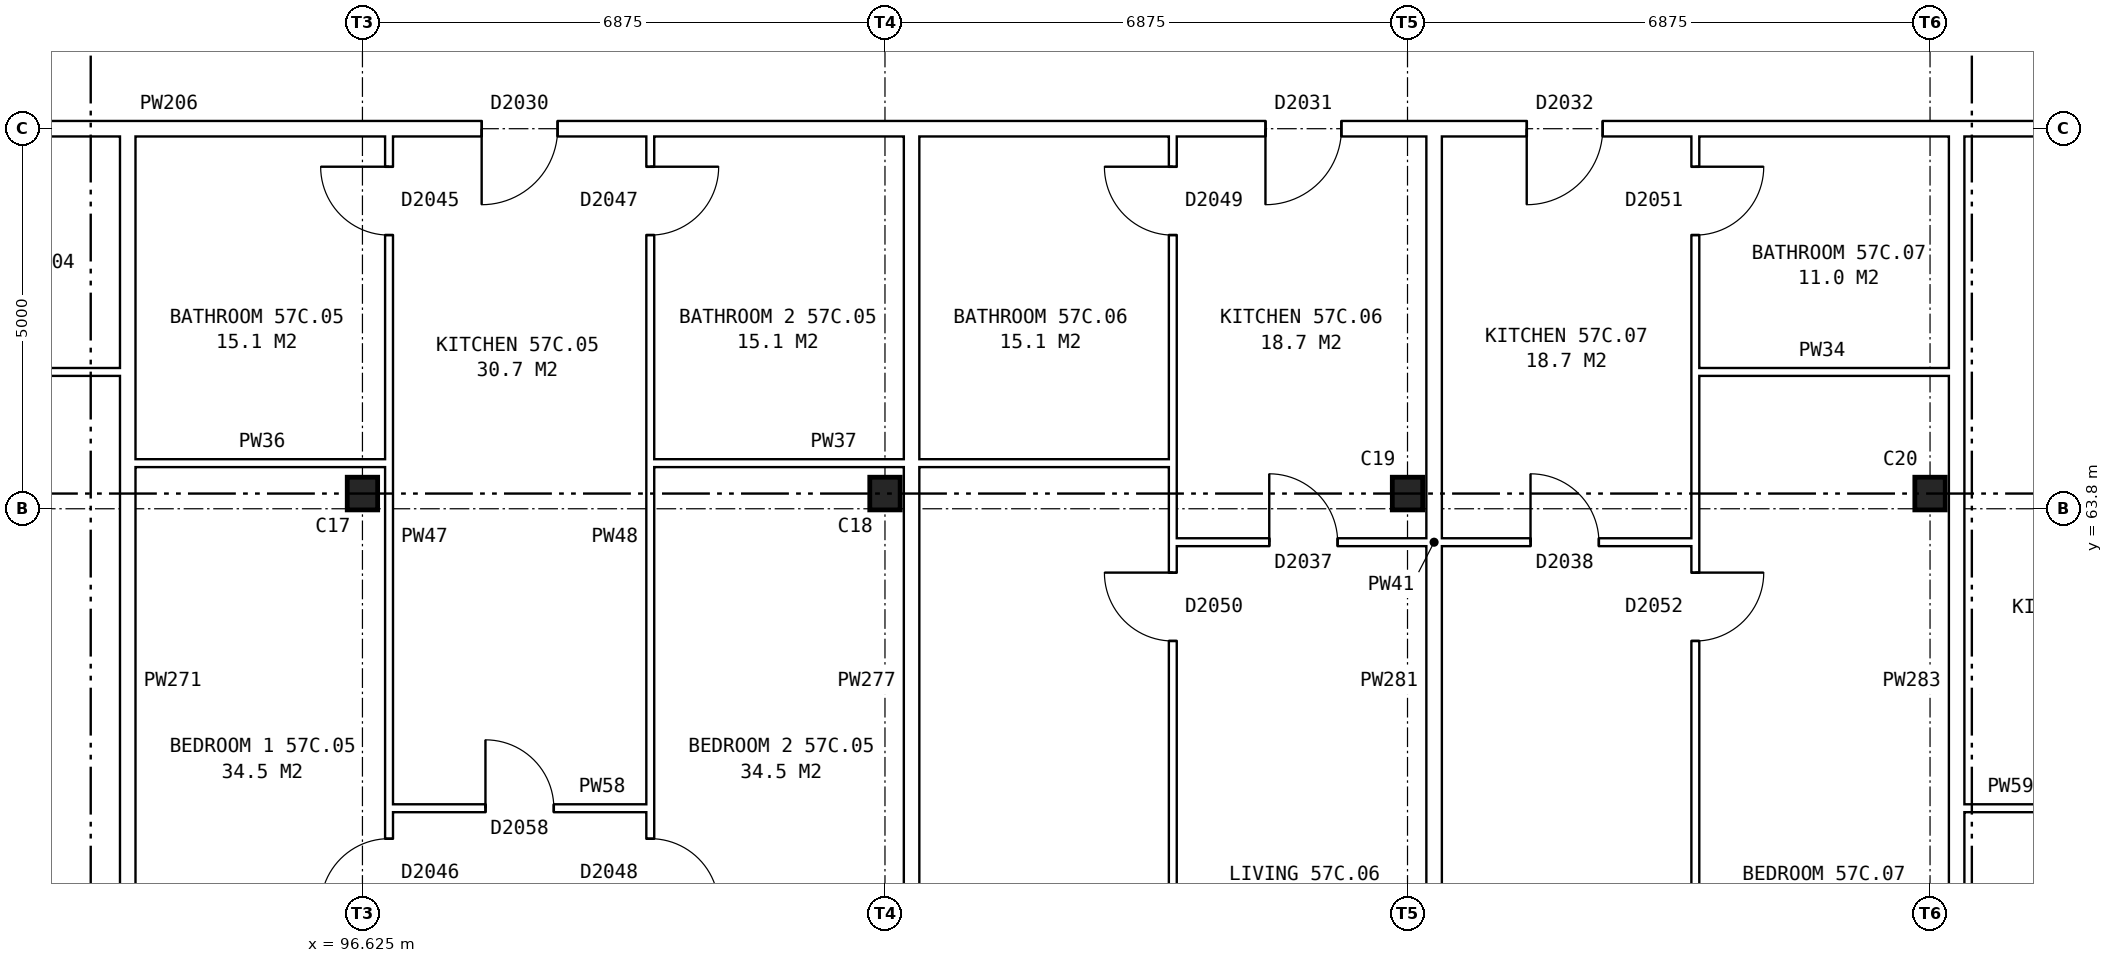
"""IFC4 building model, lengths in metres.
Left out: names, types, materials, properties, quantities, classifications, styles, units other than length and angle.
Written with IfcOpenShell. Run it as: python <this file> out.ifc"""

import sys

from ifc_helpers import new_model, si_unit, direction, frame, frame_2d, origin, origin_2d, place, context, subcontext, project, spatial, rectangle, i_section, extrude, element, fill, save


model = new_model("IFC4")
c1 = context("Model", 3, precision=1e-05, world=origin(), true_north=direction((0.0, 1.0)))
c2 = subcontext(c1, "Body", "Model", "MODEL_VIEW")
j1 = project(units=[si_unit("LENGTHUNIT", "METRE"), si_unit("PLANEANGLEUNIT", "RADIAN")], contexts=[c1])
p1 = place(None, origin())
s1 = spatial("IfcSite", under=j1, at=p1, CompositionType="ELEMENT")
p2 = place(p1, origin())
s2 = spatial("IfcBuilding", under=s1, at=p2, CompositionType="ELEMENT")
p3 = place(p2, frame((0.0, 0.0, 202.8)))
s3 = spatial("IfcBuildingStorey", under=s2, at=p3, CompositionType="ELEMENT", Elevation=202.8)
for number, where, z_axis, x_axis in (
    (1, (96.625, 64.0, 0.0), (0.0, 0.0, 1.0), (1.0, 0.0, 0.0)),
    (2, (103.5, 64.0, 0.0), (0.0, 0.0, 1.0), (1.0, 0.0, 0.0)),
    (3, (110.375, 64.0, 0.0), (0.0, 0.0, 1.0), (1.0, 0.0, 0.0)),
    (4, (117.25, 64.0, 0.0), (0.0, 0.0, 1.0), (1.0, 0.0, 0.0)),
):
    element("IfcColumn", number, at=place(p3, frame(where, z_axis=z_axis, x_axis=x_axis)), inside=s3, PredefinedType="COLUMN", context=c2, shape_type="SweptSolid", body=[
        extrude(i_section(OverallWidth=0.4, OverallDepth=0.43, WebThickness=0.04, FlangeThickness=0.04, at=origin_2d()), origin(), (0.0, 0.0, 1.0), 2.85),
    ])
p4 = place(p3, frame((96.975, 59.86, 0.0), z_axis=(0.0, 0.0, 1.0), x_axis=(1.0, 0.0, 0.0)))
e5 = element("IfcWall", 5, at=p4, inside=s3, PredefinedType="PARTITIONING", context=c2, shape_type="SweptSolid", body=[
    extrude(rectangle(XDim=3.437, YDim=0.1, at=frame_2d((1.719, 0.0))), origin(), (0.0, 0.0, 1.0), 2.85),
])
p5 = place(p4, frame((1.269, 0.0, 0.0)))
e6 = element("IfcOpeningElement", 6, at=p5, cuts=e5, PredefinedType="OPENING", context=c2, shape_type="SweptSolid", body=[
    extrude(rectangle(XDim=0.9, YDim=2.1, at=frame_2d((0.45, 1.05))), frame((0.0, 0.06, 0.0), z_axis=(0.0, -1.0, 0.0), x_axis=(1.0, 0.0, 0.0)), (0.0, 0.0, 1.0), 0.12),
])
p6 = place(p3, frame((117.7, 59.86, 0.0), z_axis=(0.0, 0.0, 1.0), x_axis=(1.0, 0.0, 0.0)))
e7 = element("IfcWall", 7, at=p6, inside=s3, PredefinedType="PARTITIONING", context=c2, shape_type="SweptSolid", body=[
    extrude(rectangle(XDim=3.337, YDim=0.1, at=frame_2d((1.668, 0.0))), origin(), (0.0, 0.0, 1.0), 2.85),
])
p7 = place(p6, frame((1.219, 0.0, 0.0)))
e8 = element("IfcOpeningElement", 8, at=p7, cuts=e7, PredefinedType="OPENING", context=c2, shape_type="SweptSolid", body=[
    extrude(rectangle(XDim=0.9, YDim=2.1, at=frame_2d((0.45, 1.05))), frame((0.0, 0.06, 0.0), z_axis=(0.0, -1.0, 0.0), x_axis=(1.0, 0.0, 0.0)), (0.0, 0.0, 1.0), 0.12),
])
p8 = place(p3, frame((107.287, 63.36, 0.0), z_axis=(0.0, 0.0, 1.0), x_axis=(1.0, 0.0, 0.0)))
e9 = element("IfcWall", 9, at=p8, inside=s3, PredefinedType="PARTITIONING", context=c2, shape_type="SweptSolid", body=[
    extrude(rectangle(XDim=6.875, YDim=0.1, at=frame_2d((3.438, 0.0))), origin(), (0.0, 0.0, 1.0), 2.85),
])
p9 = place(p8, frame((1.269, 0.0, 0.0)))
e10 = element("IfcOpeningElement", 10, at=p9, cuts=e9, PredefinedType="OPENING", context=c2, shape_type="SweptSolid", body=[
    extrude(rectangle(XDim=0.9, YDim=2.1, at=frame_2d((0.45, 1.05))), frame((0.0, 0.06, 0.0), z_axis=(0.0, -1.0, 0.0), x_axis=(1.0, 0.0, 0.0)), (0.0, 0.0, 1.0), 0.12),
])
p10 = place(p8, frame((4.707, 0.0, 0.0)))
e11 = element("IfcOpeningElement", 11, at=p10, cuts=e9, PredefinedType="OPENING", context=c2, shape_type="SweptSolid", body=[
    extrude(rectangle(XDim=0.9, YDim=2.1, at=frame_2d((0.45, 1.05))), frame((0.0, 0.06, 0.0), z_axis=(0.0, -1.0, 0.0), x_axis=(1.0, 0.0, 0.0)), (0.0, 0.0, 1.0), 0.12),
])
p11 = place(p3, frame((93.637, 64.4, 0.0), z_axis=(0.0, 0.0, 1.0), x_axis=(1.0, 0.0, 0.0)))
e12 = element("IfcWall", 12, at=p11, inside=s3, PredefinedType="PARTITIONING", context=c2, shape_type="SweptSolid", body=[
    extrude(rectangle(XDim=3.338, YDim=0.1, at=frame_2d((1.669, 0.0))), origin(), (0.0, 0.0, 1.0), 2.85),
])
p12 = place(p3, frame((100.412, 64.4, 0.0), z_axis=(0.0, 0.0, 1.0), x_axis=(1.0, 0.0, 0.0)))
e13 = element("IfcWall", 13, at=p12, inside=s3, PredefinedType="PARTITIONING", context=c2, shape_type="SweptSolid", body=[
    extrude(rectangle(XDim=6.875, YDim=0.1, at=frame_2d((3.438, 0.0))), origin(), (0.0, 0.0, 1.0), 2.85),
])
p13 = place(p3, frame((90.1, 65.6, 0.0), z_axis=(0.0, 0.0, 1.0), x_axis=(1.0, 0.0, 0.0)))
e14 = element("IfcWall", 14, at=p13, inside=s3, PredefinedType="PARTITIONING", context=c2, shape_type="SweptSolid", body=[
    extrude(rectangle(XDim=3.337, YDim=0.1, at=frame_2d((1.668, 0.0))), origin(), (0.0, 0.0, 1.0), 2.85),
])
p14 = place(p3, frame((114.162, 65.6, 0.0), z_axis=(0.0, 0.0, 1.0), x_axis=(1.0, 0.0, 0.0)))
e15 = element("IfcWall", 15, at=p14, inside=s3, PredefinedType="PARTITIONING", context=c2, shape_type="SweptSolid", body=[
    extrude(rectangle(XDim=3.338, YDim=0.1, at=frame_2d((1.669, 0.0))), origin(), (0.0, 0.0, 1.0), 2.85),
])
p15 = place(p3, frame((75.64, 68.8, 0.0), z_axis=(0.0, 0.0, 1.0), x_axis=(1.0, 0.0, 0.0)))
e16 = element("IfcWall", 16, at=p15, inside=s3, PredefinedType="PARTITIONING", context=c2, shape_type="SweptSolid", body=[
    extrude(rectangle(XDim=55.72, YDim=0.2, at=frame_2d((27.86, 0.0))), origin(), (0.0, 0.0, 1.0), 2.85),
])
p16 = place(p15, frame((5.191, 0.0, 0.0)))
e17 = element("IfcOpeningElement", 17, at=p16, cuts=e16, PredefinedType="OPENING", context=c2, shape_type="SweptSolid", body=[
    extrude(rectangle(XDim=1.0, YDim=2.1, at=frame_2d((0.5, 1.05))), frame((0.0, 0.11, 0.0), z_axis=(0.0, -1.0, 0.0), x_axis=(1.0, 0.0, 0.0)), (0.0, 0.0, 1.0), 0.22),
])
p17 = place(p15, frame((12.241, 0.0, 0.0)))
e18 = element("IfcOpeningElement", 18, at=p17, cuts=e16, PredefinedType="OPENING", context=c2, shape_type="SweptSolid", body=[
    extrude(rectangle(XDim=1.0, YDim=2.1, at=frame_2d((0.5, 1.05))), frame((0.0, 0.11, 0.0), z_axis=(0.0, -1.0, 0.0), x_axis=(1.0, 0.0, 0.0)), (0.0, 0.0, 1.0), 0.22),
])
p18 = place(p15, frame((22.553, 0.0, 0.0)))
e19 = element("IfcOpeningElement", 19, at=p18, cuts=e16, PredefinedType="OPENING", context=c2, shape_type="SweptSolid", body=[
    extrude(rectangle(XDim=1.0, YDim=2.1, at=frame_2d((0.5, 1.05))), frame((0.0, 0.11, 0.0), z_axis=(0.0, -1.0, 0.0), x_axis=(1.0, 0.0, 0.0)), (0.0, 0.0, 1.0), 0.22),
])
p19 = place(p15, frame((32.866, 0.0, 0.0)))
e20 = element("IfcOpeningElement", 20, at=p19, cuts=e16, PredefinedType="OPENING", context=c2, shape_type="SweptSolid", body=[
    extrude(rectangle(XDim=1.0, YDim=2.1, at=frame_2d((0.5, 1.05))), frame((0.0, 0.11, 0.0), z_axis=(0.0, -1.0, 0.0), x_axis=(1.0, 0.0, 0.0)), (0.0, 0.0, 1.0), 0.22),
])
p20 = place(p15, frame((36.303, 0.0, 0.0)))
e21 = element("IfcOpeningElement", 21, at=p20, cuts=e16, PredefinedType="OPENING", context=c2, shape_type="SweptSolid", body=[
    extrude(rectangle(XDim=1.0, YDim=2.1, at=frame_2d((0.5, 1.05))), frame((0.0, 0.11, 0.0), z_axis=(0.0, -1.0, 0.0), x_axis=(1.0, 0.0, 0.0)), (0.0, 0.0, 1.0), 0.22),
])
p21 = place(p15, frame((43.178, 0.0, 0.0)))
e22 = element("IfcOpeningElement", 22, at=p21, cuts=e16, PredefinedType="OPENING", context=c2, shape_type="SweptSolid", body=[
    extrude(rectangle(XDim=1.0, YDim=2.1, at=frame_2d((0.5, 1.05))), frame((0.0, 0.11, 0.0), z_axis=(0.0, -1.0, 0.0), x_axis=(1.0, 0.0, 0.0)), (0.0, 0.0, 1.0), 0.22),
])
p22 = place(p15, frame((50.053, 0.0, 0.0)))
e23 = element("IfcOpeningElement", 23, at=p22, cuts=e16, PredefinedType="OPENING", context=c2, shape_type="SweptSolid", body=[
    extrude(rectangle(XDim=1.0, YDim=2.1, at=frame_2d((0.5, 1.05))), frame((0.0, 0.11, 0.0), z_axis=(0.0, -1.0, 0.0), x_axis=(1.0, 0.0, 0.0)), (0.0, 0.0, 1.0), 0.22),
])
p23 = place(p3, frame((93.537, 54.36, 0.0), z_axis=(0.0, 0.0, 1.0), x_axis=(0.0, 1.0, 0.0)))
e24 = element("IfcWall", 24, at=p23, inside=s3, PredefinedType="PARTITIONING", context=c2, shape_type="SweptSolid", body=[
    extrude(rectangle(XDim=14.34, YDim=0.2, at=frame_2d((7.17, 0.0))), origin(), (0.0, 0.0, 1.0), 2.85),
])
p24 = place(p3, frame((96.975, 54.36, 0.0), z_axis=(0.0, 0.0, 1.0), x_axis=(0.0, 1.0, 0.0)))
e25 = element("IfcWall", 25, at=p24, inside=s3, PredefinedType="PARTITIONING", context=c2, shape_type="SweptSolid", body=[
    extrude(rectangle(XDim=14.34, YDim=0.1, at=frame_2d((7.17, 0.0))), origin(), (0.0, 0.0, 1.0), 2.85),
])
p25 = place(p24, frame((4.2, 0.0, 0.0)))
e26 = element("IfcOpeningElement", 26, at=p25, cuts=e25, PredefinedType="OPENING", context=c2, shape_type="SweptSolid", body=[
    extrude(rectangle(XDim=0.9, YDim=2.1, at=frame_2d((0.45, 1.05))), frame((0.0, 0.06, 0.0), z_axis=(0.0, -1.0, 0.0), x_axis=(1.0, 0.0, 0.0)), (0.0, 0.0, 1.0), 0.12),
])
p26 = place(p24, frame((13.04, 0.0, 0.0)))
e27 = element("IfcOpeningElement", 27, at=p26, cuts=e25, PredefinedType="OPENING", context=c2, shape_type="SweptSolid", body=[
    extrude(rectangle(XDim=0.9, YDim=2.1, at=frame_2d((0.45, 1.05))), frame((0.0, 0.06, 0.0), z_axis=(0.0, -1.0, 0.0), x_axis=(1.0, 0.0, 0.0)), (0.0, 0.0, 1.0), 0.12),
])
p27 = place(p3, frame((100.412, 54.36, 0.0), z_axis=(0.0, 0.0, 1.0), x_axis=(0.0, 1.0, 0.0)))
e28 = element("IfcWall", 28, at=p27, inside=s3, PredefinedType="PARTITIONING", context=c2, shape_type="SweptSolid", body=[
    extrude(rectangle(XDim=14.34, YDim=0.1, at=frame_2d((7.17, 0.0))), origin(), (0.0, 0.0, 1.0), 2.85),
])
p28 = place(p27, frame((4.2, 0.0, 0.0)))
e29 = element("IfcOpeningElement", 29, at=p28, cuts=e28, PredefinedType="OPENING", context=c2, shape_type="SweptSolid", body=[
    extrude(rectangle(XDim=0.9, YDim=2.1, at=frame_2d((0.45, 1.05))), frame((0.0, 0.06, 0.0), z_axis=(0.0, -1.0, 0.0), x_axis=(1.0, 0.0, 0.0)), (0.0, 0.0, 1.0), 0.12),
])
p29 = place(p27, frame((13.04, 0.0, 0.0)))
e30 = element("IfcOpeningElement", 30, at=p29, cuts=e28, PredefinedType="OPENING", context=c2, shape_type="SweptSolid", body=[
    extrude(rectangle(XDim=0.9, YDim=2.1, at=frame_2d((0.45, 1.05))), frame((0.0, 0.06, 0.0), z_axis=(0.0, -1.0, 0.0), x_axis=(1.0, 0.0, 0.0)), (0.0, 0.0, 1.0), 0.12),
])
p30 = place(p3, frame((103.85, 54.36, 0.0), z_axis=(0.0, 0.0, 1.0), x_axis=(0.0, 1.0, 0.0)))
e31 = element("IfcWall", 31, at=p30, inside=s3, PredefinedType="PARTITIONING", context=c2, shape_type="SweptSolid", body=[
    extrude(rectangle(XDim=14.34, YDim=0.2, at=frame_2d((7.17, 0.0))), origin(), (0.0, 0.0, 1.0), 2.85),
])
p31 = place(p3, frame((107.287, 54.36, 0.0), z_axis=(0.0, 0.0, 1.0), x_axis=(0.0, 1.0, 0.0)))
e32 = element("IfcWall", 32, at=p31, inside=s3, PredefinedType="PARTITIONING", context=c2, shape_type="SweptSolid", body=[
    extrude(rectangle(XDim=14.34, YDim=0.1, at=frame_2d((7.17, 0.0))), origin(), (0.0, 0.0, 1.0), 2.85),
])
p32 = place(p31, frame((7.7, 0.0, 0.0)))
e33 = element("IfcOpeningElement", 33, at=p32, cuts=e32, PredefinedType="OPENING", context=c2, shape_type="SweptSolid", body=[
    extrude(rectangle(XDim=0.9, YDim=2.1, at=frame_2d((0.45, 1.05))), frame((0.0, 0.06, 0.0), z_axis=(0.0, -1.0, 0.0), x_axis=(1.0, 0.0, 0.0)), (0.0, 0.0, 1.0), 0.12),
])
p33 = place(p31, frame((13.04, 0.0, 0.0)))
e34 = element("IfcOpeningElement", 34, at=p33, cuts=e32, PredefinedType="OPENING", context=c2, shape_type="SweptSolid", body=[
    extrude(rectangle(XDim=0.9, YDim=2.1, at=frame_2d((0.45, 1.05))), frame((0.0, 0.06, 0.0), z_axis=(0.0, -1.0, 0.0), x_axis=(1.0, 0.0, 0.0)), (0.0, 0.0, 1.0), 0.12),
])
p34 = place(p3, frame((110.725, 54.36, 0.0), z_axis=(0.0, 0.0, 1.0), x_axis=(0.0, 1.0, 0.0)))
e35 = element("IfcWall", 35, at=p34, inside=s3, PredefinedType="PARTITIONING", context=c2, shape_type="SweptSolid", body=[
    extrude(rectangle(XDim=14.34, YDim=0.2, at=frame_2d((7.17, 0.0))), origin(), (0.0, 0.0, 1.0), 2.85),
])
p35 = place(p3, frame((114.162, 54.36, 0.0), z_axis=(0.0, 0.0, 1.0), x_axis=(0.0, 1.0, 0.0)))
e36 = element("IfcWall", 36, at=p35, inside=s3, PredefinedType="PARTITIONING", context=c2, shape_type="SweptSolid", body=[
    extrude(rectangle(XDim=14.34, YDim=0.1, at=frame_2d((7.17, 0.0))), origin(), (0.0, 0.0, 1.0), 2.85),
])
p36 = place(p35, frame((7.7, 0.0, 0.0)))
e37 = element("IfcOpeningElement", 37, at=p36, cuts=e36, PredefinedType="OPENING", context=c2, shape_type="SweptSolid", body=[
    extrude(rectangle(XDim=0.9, YDim=2.1, at=frame_2d((0.45, 1.05))), frame((0.0, 0.06, 0.0), z_axis=(0.0, -1.0, 0.0), x_axis=(1.0, 0.0, 0.0)), (0.0, 0.0, 1.0), 0.12),
])
p37 = place(p35, frame((13.04, 0.0, 0.0)))
e38 = element("IfcOpeningElement", 38, at=p37, cuts=e36, PredefinedType="OPENING", context=c2, shape_type="SweptSolid", body=[
    extrude(rectangle(XDim=0.9, YDim=2.1, at=frame_2d((0.45, 1.05))), frame((0.0, 0.06, 0.0), z_axis=(0.0, -1.0, 0.0), x_axis=(1.0, 0.0, 0.0)), (0.0, 0.0, 1.0), 0.12),
])
p38 = place(p3, frame((117.6, 54.36, 0.0), z_axis=(0.0, 0.0, 1.0), x_axis=(0.0, 1.0, 0.0)))
e39 = element("IfcWall", 39, at=p38, inside=s3, PredefinedType="PARTITIONING", context=c2, shape_type="SweptSolid", body=[
    extrude(rectangle(XDim=14.34, YDim=0.2, at=frame_2d((7.17, 0.0))), origin(), (0.0, 0.0, 1.0), 2.85),
])
p39 = place(p25, origin())
e40 = element("IfcDoor", 40, at=p39, inside=s3, OperationType="SINGLE_SWING_LEFT", PredefinedType="DOOR", context=c2, shape_type="SweptSolid", body=[
    extrude(rectangle(XDim=0.9, YDim=2.1, at=frame_2d((0.45, 1.05))), frame((0.0, 0.025, 0.0), z_axis=(0.0, -1.0, 0.0), x_axis=(1.0, 0.0, 0.0)), (0.0, 0.0, 1.0), 0.05),
])
fill(e26, e40)
p40 = place(p28, frame((0.9, 0.0, 0.0), z_axis=(0.0, 0.0, 1.0), x_axis=(-1.0, 0.0, 0.0)))
e41 = element("IfcDoor", 41, at=p40, inside=s3, OperationType="SINGLE_SWING_RIGHT", PredefinedType="DOOR", context=c2, shape_type="SweptSolid", body=[
    extrude(rectangle(XDim=0.9, YDim=2.1, at=frame_2d((0.45, 1.05))), frame((0.0, 0.025, 0.0), z_axis=(0.0, -1.0, 0.0), x_axis=(1.0, 0.0, 0.0)), (0.0, 0.0, 1.0), 0.05),
])
fill(e29, e41)
p41 = place(p18, frame((1.0, 0.0, 0.0), z_axis=(0.0, 0.0, 1.0), x_axis=(-1.0, 0.0, 0.0)))
e42 = element("IfcDoor", 42, at=p41, inside=s3, OperationType="SINGLE_SWING_RIGHT", PredefinedType="DOOR", context=c2, shape_type="SweptSolid", body=[
    extrude(rectangle(XDim=1.0, YDim=2.1, at=frame_2d((0.5, 1.05))), frame((0.0, 0.025, 0.0), z_axis=(0.0, -1.0, 0.0), x_axis=(1.0, 0.0, 0.0)), (0.0, 0.0, 1.0), 0.05),
])
fill(e19, e42)
p42 = place(p5, origin())
e43 = element("IfcDoor", 43, at=p42, inside=s3, OperationType="SINGLE_SWING_LEFT", PredefinedType="DOOR", context=c2, shape_type="SweptSolid", body=[
    extrude(rectangle(XDim=0.9, YDim=2.1, at=frame_2d((0.45, 1.05))), frame((0.0, 0.025, 0.0), z_axis=(0.0, -1.0, 0.0), x_axis=(1.0, 0.0, 0.0)), (0.0, 0.0, 1.0), 0.05),
])
fill(e6, e43)
p43 = place(p26, origin())
e44 = element("IfcDoor", 44, at=p43, inside=s3, OperationType="SINGLE_SWING_RIGHT", PredefinedType="DOOR", context=c2, shape_type="SweptSolid", body=[
    extrude(rectangle(XDim=0.9, YDim=2.1, at=frame_2d((0.45, 1.05))), frame((0.0, 0.025, 0.0), z_axis=(0.0, -1.0, 0.0), x_axis=(1.0, 0.0, 0.0)), (0.0, 0.0, 1.0), 0.05),
])
fill(e27, e44)
p44 = place(p29, frame((0.9, 0.0, 0.0), z_axis=(0.0, 0.0, 1.0), x_axis=(-1.0, 0.0, 0.0)))
e45 = element("IfcDoor", 45, at=p44, inside=s3, OperationType="SINGLE_SWING_LEFT", PredefinedType="DOOR", context=c2, shape_type="SweptSolid", body=[
    extrude(rectangle(XDim=0.9, YDim=2.1, at=frame_2d((0.45, 1.05))), frame((0.0, 0.025, 0.0), z_axis=(0.0, -1.0, 0.0), x_axis=(1.0, 0.0, 0.0)), (0.0, 0.0, 1.0), 0.05),
])
fill(e30, e45)
p45 = place(p32, origin())
e46 = element("IfcDoor", 46, at=p45, inside=s3, OperationType="SINGLE_SWING_RIGHT", PredefinedType="DOOR", context=c2, shape_type="SweptSolid", body=[
    extrude(rectangle(XDim=0.9, YDim=2.1, at=frame_2d((0.45, 1.05))), frame((0.0, 0.025, 0.0), z_axis=(0.0, -1.0, 0.0), x_axis=(1.0, 0.0, 0.0)), (0.0, 0.0, 1.0), 0.05),
])
fill(e33, e46)
p46 = place(p19, frame((1.0, 0.0, 0.0), z_axis=(0.0, 0.0, 1.0), x_axis=(-1.0, 0.0, 0.0)))
e47 = element("IfcDoor", 47, at=p46, inside=s3, OperationType="SINGLE_SWING_RIGHT", PredefinedType="DOOR", context=c2, shape_type="SweptSolid", body=[
    extrude(rectangle(XDim=1.0, YDim=2.1, at=frame_2d((0.5, 1.05))), frame((0.0, 0.025, 0.0), z_axis=(0.0, -1.0, 0.0), x_axis=(1.0, 0.0, 0.0)), (0.0, 0.0, 1.0), 0.05),
])
fill(e20, e47)
p47 = place(p9, origin())
e48 = element("IfcDoor", 48, at=p47, inside=s3, OperationType="SINGLE_SWING_LEFT", PredefinedType="DOOR", context=c2, shape_type="SweptSolid", body=[
    extrude(rectangle(XDim=0.9, YDim=2.1, at=frame_2d((0.45, 1.05))), frame((0.0, 0.025, 0.0), z_axis=(0.0, -1.0, 0.0), x_axis=(1.0, 0.0, 0.0)), (0.0, 0.0, 1.0), 0.05),
])
fill(e10, e48)
p48 = place(p33, origin())
e49 = element("IfcDoor", 49, at=p48, inside=s3, OperationType="SINGLE_SWING_RIGHT", PredefinedType="DOOR", context=c2, shape_type="SweptSolid", body=[
    extrude(rectangle(XDim=0.9, YDim=2.1, at=frame_2d((0.45, 1.05))), frame((0.0, 0.025, 0.0), z_axis=(0.0, -1.0, 0.0), x_axis=(1.0, 0.0, 0.0)), (0.0, 0.0, 1.0), 0.05),
])
fill(e34, e49)
p49 = place(p36, frame((0.9, 0.0, 0.0), z_axis=(0.0, 0.0, 1.0), x_axis=(-1.0, 0.0, 0.0)))
e50 = element("IfcDoor", 50, at=p49, inside=s3, OperationType="SINGLE_SWING_LEFT", PredefinedType="DOOR", context=c2, shape_type="SweptSolid", body=[
    extrude(rectangle(XDim=0.9, YDim=2.1, at=frame_2d((0.45, 1.05))), frame((0.0, 0.025, 0.0), z_axis=(0.0, -1.0, 0.0), x_axis=(1.0, 0.0, 0.0)), (0.0, 0.0, 1.0), 0.05),
])
fill(e37, e50)
p50 = place(p20, frame((1.0, 0.0, 0.0), z_axis=(0.0, 0.0, 1.0), x_axis=(-1.0, 0.0, 0.0)))
e51 = element("IfcDoor", 51, at=p50, inside=s3, OperationType="SINGLE_SWING_RIGHT", PredefinedType="DOOR", context=c2, shape_type="SweptSolid", body=[
    extrude(rectangle(XDim=1.0, YDim=2.1, at=frame_2d((0.5, 1.05))), frame((0.0, 0.025, 0.0), z_axis=(0.0, -1.0, 0.0), x_axis=(1.0, 0.0, 0.0)), (0.0, 0.0, 1.0), 0.05),
])
fill(e21, e51)
p51 = place(p10, origin())
e52 = element("IfcDoor", 52, at=p51, inside=s3, OperationType="SINGLE_SWING_LEFT", PredefinedType="DOOR", context=c2, shape_type="SweptSolid", body=[
    extrude(rectangle(XDim=0.9, YDim=2.1, at=frame_2d((0.45, 1.05))), frame((0.0, 0.025, 0.0), z_axis=(0.0, -1.0, 0.0), x_axis=(1.0, 0.0, 0.0)), (0.0, 0.0, 1.0), 0.05),
])
fill(e11, e52)
p52 = place(p37, frame((0.9, 0.0, 0.0), z_axis=(0.0, 0.0, 1.0), x_axis=(-1.0, 0.0, 0.0)))
e53 = element("IfcDoor", 53, at=p52, inside=s3, OperationType="SINGLE_SWING_LEFT", PredefinedType="DOOR", context=c2, shape_type="SweptSolid", body=[
    extrude(rectangle(XDim=0.9, YDim=2.1, at=frame_2d((0.45, 1.05))), frame((0.0, 0.025, 0.0), z_axis=(0.0, -1.0, 0.0), x_axis=(1.0, 0.0, 0.0)), (0.0, 0.0, 1.0), 0.05),
])
fill(e38, e53)
save(model, sys.argv[1])
